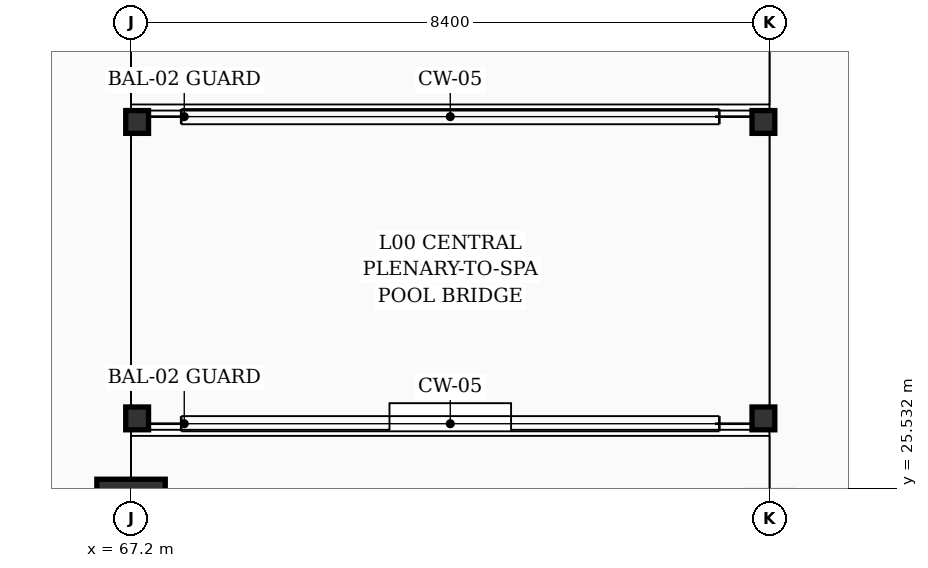
"""IFC4 building model, lengths in metres.
Left out: names, types, materials, properties, quantities, classifications, styles, units other than length and angle.
Written with IfcOpenShell. Run it as: python <this file> out.ifc"""

import sys

from ifc_helpers import new_model, si_unit, direction, frame, origin, origin_2d, place, context, subcontext, project, spatial, rectangle, hollow_rectangle, extrude, element, save


model = new_model("IFC4")
c1 = context("Model", 3, precision=1e-05, world=origin(), true_north=direction((0.0, 1.0)))
c2 = subcontext(c1, "Body", "Model", "MODEL_VIEW")
j1 = project(units=[si_unit("LENGTHUNIT", "METRE"), si_unit("PLANEANGLEUNIT", "RADIAN")], contexts=[c1])
p1 = place(None, origin())
s1 = spatial("IfcSite", under=j1, at=p1, CompositionType="ELEMENT")
p2 = place(p1, origin())
s2 = spatial("IfcBuilding", under=s1, at=p2, CompositionType="ELEMENT")
p3 = place(p2, origin())
s3 = spatial("IfcBuildingStorey", under=s2, at=p3, CompositionType="ELEMENT", Elevation=0.0)
p4 = place(p3, frame((67.2, 25.2, 0.0), z_axis=(0.0, 0.0, 1.0), x_axis=(1.0, 0.0, 0.0)))
e1 = element("IfcColumn", 1, at=p4, inside=s3, PredefinedType="COLUMN", context=c2, shape_type="SweptSolid", body=[
    extrude(rectangle(XDim=0.9, YDim=0.9, at=origin_2d()), origin(), (0.0, 0.0, 1.0), 3.92),
])
for number, where, z_axis, x_axis in (
    (2, (67.28, 26.45, 0.0), (0.0, 0.0, 1.0), (1.0, 0.0, 0.0)),
    (3, (67.28, 30.35, 0.0), (0.0, 0.0, 1.0), (1.0, 0.0, 0.0)),
    (4, (75.52, 26.45, 0.0), (0.0, 0.0, 1.0), (1.0, 0.0, 0.0)),
    (5, (75.52, 30.35, 0.0), (0.0, 0.0, 1.0), (1.0, 0.0, 0.0)),
):
    element("IfcColumn", number, at=place(p3, frame(where, z_axis=z_axis, x_axis=x_axis)), inside=s3, PredefinedType="COLUMN", context=c2, shape_type="SweptSolid", body=[
        extrude(hollow_rectangle(XDim=0.3, YDim=0.3, WallThickness=0.016, at=origin_2d()), origin(), (0.0, 0.0, 1.0), 3.92),
    ])
save(model, sys.argv[1])
